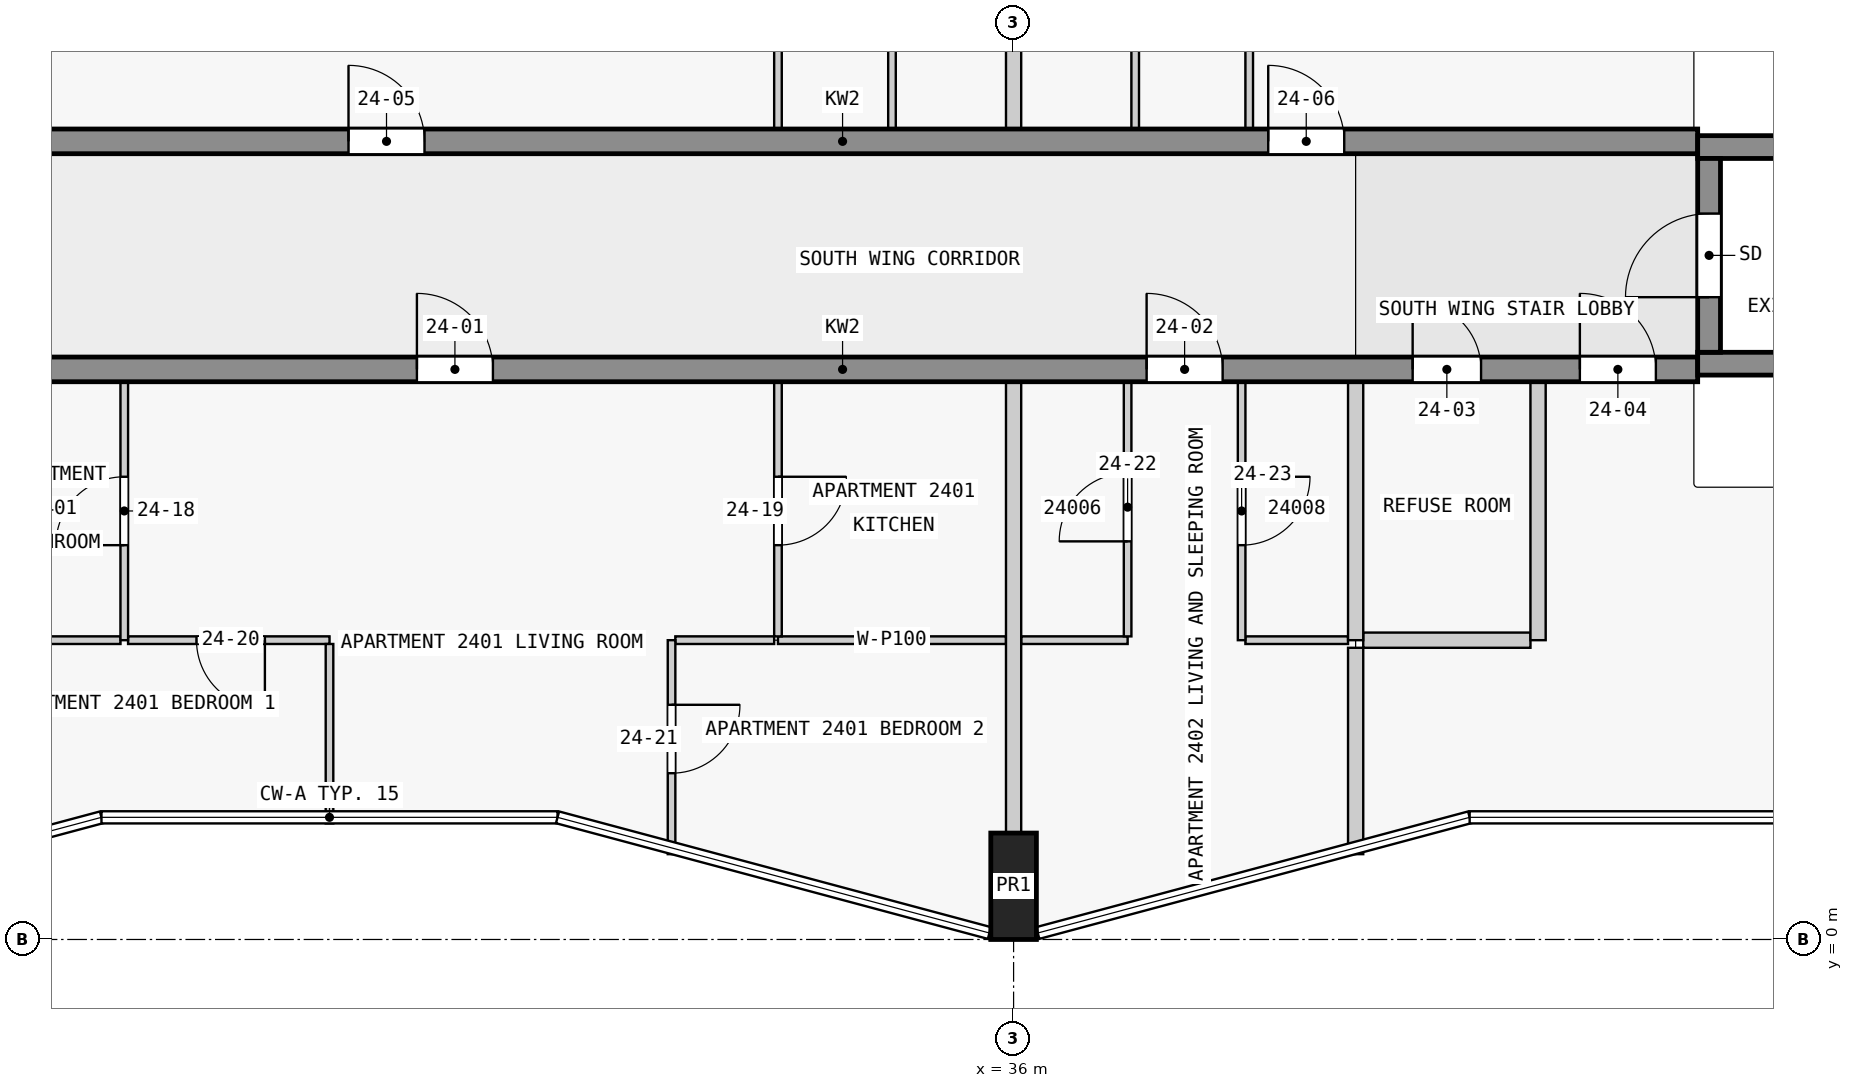
"""IFC4 building model, lengths in metres.
Left out: names, types, materials, properties, quantities, classifications, styles, units other than length and angle.
Written with IfcOpenShell. Run it as: python <this file> out.ifc"""

import sys

from ifc_helpers import new_model, si_unit, direction, frame, frame_2d, origin, origin_2d, place, context, subcontext, project, spatial, rectangle, extrude, element, fill, save


model = new_model("IFC4")
c1 = context("Model", 3, precision=1e-05, world=origin(), true_north=direction((0.0, 1.0)))
c2 = subcontext(c1, "Body", "Model", "MODEL_VIEW")
j1 = project(units=[si_unit("LENGTHUNIT", "METRE"), si_unit("PLANEANGLEUNIT", "RADIAN")], contexts=[c1])
p1 = place(None, origin())
s1 = spatial("IfcSite", under=j1, at=p1, CompositionType="ELEMENT")
p2 = place(p1, origin())
s2 = spatial("IfcBuilding", under=s1, at=p2, CompositionType="ELEMENT")
p3 = place(p2, frame((0.0, 0.0, 95.8)))
s3 = spatial("IfcBuildingStorey", under=s2, at=p3, CompositionType="ELEMENT", Elevation=95.8)
p4 = place(p3, frame((36.0, 0.7, 0.0), z_axis=(0.0, 0.0, 1.0), x_axis=(1.0, 0.0, 0.0)))
e1 = element("IfcColumn", 1, at=p4, inside=s3, PredefinedType="COLUMN", context=c2, shape_type="SweptSolid", body=[
    extrude(rectangle(XDim=0.6, YDim=1.4, at=origin_2d()), origin(), (0.0, 0.0, 1.0), 3.5),
])
p5 = place(p3, frame((45.15, 7.725, 0.0), z_axis=(0.0, 0.0, 1.0), x_axis=(0.0, 1.0, 0.0)))
e2 = element("IfcWall", 2, at=p5, inside=s3, PredefinedType="SHEAR", context=c2, shape_type="SweptSolid", body=[
    extrude(rectangle(XDim=2.55, YDim=0.3, at=frame_2d((1.275, 0.0))), origin(), (0.0, 0.0, 1.0), 3.5),
])
p6 = place(p5, frame((0.725, 0.0, 0.0)))
e3 = element("IfcOpeningElement", 3, at=p6, cuts=e2, PredefinedType="OPENING", context=c2, shape_type="SweptSolid", body=[
    extrude(rectangle(XDim=1.1, YDim=2.1, at=frame_2d((0.55, 1.05))), frame((0.0, 0.16, 0.0), z_axis=(0.0, -1.0, 0.0), x_axis=(1.0, 0.0, 0.0)), (0.0, 0.0, 1.0), 0.32),
])
for number, where, z_axis, x_axis in (
    (4, (45.0, 7.575, 0.0), (0.0, 0.0, 1.0), (1.0, 0.0, 0.0)),
    (5, (45.0, 10.425, 0.0), (0.0, 0.0, 1.0), (1.0, 0.0, 0.0)),
):
    element("IfcWall", number, at=place(p3, frame(where, z_axis=z_axis, x_axis=x_axis)), inside=s3, PredefinedType="SHEAR", context=c2, shape_type="SweptSolid", body=[
        extrude(rectangle(XDim=7.2, YDim=0.3, at=frame_2d((3.6, 0.0))), origin(), (0.0, 0.0, 1.0), 3.5),
    ])
p7 = place(p3, frame((22.5, 7.5, 0.0), z_axis=(0.0, 0.0, 1.0), x_axis=(1.0, 0.0, 0.0)))
e6 = element("IfcWall", 6, at=p7, inside=s3, PredefinedType="SHEAR", context=c2, shape_type="SweptSolid", body=[
    extrude(rectangle(XDim=22.5, YDim=0.325, at=frame_2d((11.25, 0.0))), origin(), (0.0, 0.0, 1.0), 3.25),
])
p8 = place(p7, frame((5.65, 0.0, 0.0)))
e7 = element("IfcOpeningElement", 7, at=p8, cuts=e6, PredefinedType="OPENING", context=c2, shape_type="SweptSolid", body=[
    extrude(rectangle(XDim=1.0, YDim=2.1, at=frame_2d((0.5, 1.05))), frame((0.0, 0.172, 0.0), z_axis=(0.0, -1.0, 0.0), x_axis=(1.0, 0.0, 0.0)), (0.0, 0.0, 1.0), 0.345),
])
p9 = place(p7, frame((15.25, 0.0, 0.0)))
e8 = element("IfcOpeningElement", 8, at=p9, cuts=e6, PredefinedType="OPENING", context=c2, shape_type="SweptSolid", body=[
    extrude(rectangle(XDim=1.0, YDim=2.1, at=frame_2d((0.5, 1.05))), frame((0.0, 0.172, 0.0), z_axis=(0.0, -1.0, 0.0), x_axis=(1.0, 0.0, 0.0)), (0.0, 0.0, 1.0), 0.345),
])
p10 = place(p7, frame((18.75, 0.0, 0.0)))
e9 = element("IfcOpeningElement", 9, at=p10, cuts=e6, PredefinedType="OPENING", context=c2, shape_type="SweptSolid", body=[
    extrude(rectangle(XDim=0.9, YDim=2.1, at=frame_2d((0.45, 1.05))), frame((0.0, 0.172, 0.0), z_axis=(0.0, -1.0, 0.0), x_axis=(1.0, 0.0, 0.0)), (0.0, 0.0, 1.0), 0.345),
])
p11 = place(p7, frame((20.95, 0.0, 0.0)))
e10 = element("IfcOpeningElement", 10, at=p11, cuts=e6, PredefinedType="OPENING", context=c2, shape_type="SweptSolid", body=[
    extrude(rectangle(XDim=1.0, YDim=2.1, at=frame_2d((0.5, 1.05))), frame((0.0, 0.172, 0.0), z_axis=(0.0, -1.0, 0.0), x_axis=(1.0, 0.0, 0.0)), (0.0, 0.0, 1.0), 0.345),
])
p12 = place(p3, frame((22.5, 10.5, 0.0), z_axis=(0.0, 0.0, 1.0), x_axis=(1.0, 0.0, 0.0)))
e11 = element("IfcWall", 11, at=p12, inside=s3, PredefinedType="SHEAR", context=c2, shape_type="SweptSolid", body=[
    extrude(rectangle(XDim=22.5, YDim=0.325, at=frame_2d((11.25, 0.0))), origin(), (0.0, 0.0, 1.0), 3.25),
])
p13 = place(p12, frame((4.75, 0.0, 0.0)))
e12 = element("IfcOpeningElement", 12, at=p13, cuts=e11, PredefinedType="OPENING", context=c2, shape_type="SweptSolid", body=[
    extrude(rectangle(XDim=1.0, YDim=2.1, at=frame_2d((0.5, 1.05))), frame((0.0, 0.172, 0.0), z_axis=(0.0, -1.0, 0.0), x_axis=(1.0, 0.0, 0.0)), (0.0, 0.0, 1.0), 0.345),
])
p14 = place(p12, frame((16.85, 0.0, 0.0)))
e13 = element("IfcOpeningElement", 13, at=p14, cuts=e11, PredefinedType="OPENING", context=c2, shape_type="SweptSolid", body=[
    extrude(rectangle(XDim=1.0, YDim=2.1, at=frame_2d((0.5, 1.05))), frame((0.0, 0.172, 0.0), z_axis=(0.0, -1.0, 0.0), x_axis=(1.0, 0.0, 0.0)), (0.0, 0.0, 1.0), 0.345),
])
p15 = place(p3, frame((27.0, 3.938, 0.0), z_axis=(0.0, 0.0, 1.0), x_axis=(-1.0, 0.0, 0.0)))
e14 = element("IfcWall", 14, at=p15, inside=s3, PredefinedType="PARTITIONING", context=c2, shape_type="SweptSolid", body=[
    extrude(rectangle(XDim=2.65, YDim=0.1, at=frame_2d((1.325, 0.0))), origin(), (0.0, 0.0, 1.0), 3.25),
])
p16 = place(p15, frame((0.85, 0.0, 0.0)))
e15 = element("IfcOpeningElement", 15, at=p16, cuts=e14, PredefinedType="OPENING", context=c2, shape_type="SweptSolid", body=[
    extrude(rectangle(XDim=0.9, YDim=2.1, at=frame_2d((0.45, 1.05))), frame((0.0, 0.06, 0.0), z_axis=(0.0, -1.0, 0.0), x_axis=(1.0, 0.0, 0.0)), (0.0, 0.0, 1.0), 0.12),
])
p17 = place(p3, frame((32.85, 3.938, 0.0), z_axis=(0.0, 0.0, 1.0), x_axis=(-1.0, 0.0, 0.0)))
e16 = element("IfcWall", 16, at=p17, inside=s3, PredefinedType="PARTITIONING", context=c2, shape_type="SweptSolid", body=[
    extrude(rectangle(XDim=1.3, YDim=0.1, at=frame_2d((0.65, 0.0))), origin(), (0.0, 0.0, 1.0), 3.25),
])
p18 = place(p3, frame((22.5, 3.938, 0.0), z_axis=(0.0, 0.0, 1.0), x_axis=(1.0, 0.0, 0.0)))
e17 = element("IfcWall", 17, at=p18, inside=s3, PredefinedType="PARTITIONING", context=c2, shape_type="SweptSolid", body=[
    extrude(rectangle(XDim=1.75, YDim=0.1, at=frame_2d((0.875, 0.0))), origin(), (0.0, 0.0, 1.0), 3.25),
])
p19 = place(p3, frame((32.9, 3.938, 0.0), z_axis=(0.0, 0.0, 1.0), x_axis=(1.0, 0.0, 0.0)))
e18 = element("IfcWall", 18, at=p19, inside=s3, PredefinedType="PARTITIONING", context=c2, shape_type="SweptSolid", body=[
    extrude(rectangle(XDim=3.0, YDim=0.1, at=frame_2d((1.5, 0.0))), origin(), (0.0, 0.0, 1.0), 3.25),
])
p20 = place(p3, frame((36.1, 3.938, 0.0), z_axis=(0.0, 0.0, 1.0), x_axis=(1.0, 0.0, 0.0)))
e19 = element("IfcWall", 19, at=p20, inside=s3, PredefinedType="PARTITIONING", context=c2, shape_type="SweptSolid", body=[
    extrude(rectangle(XDim=1.4, YDim=0.1, at=frame_2d((0.7, 0.0))), origin(), (0.0, 0.0, 1.0), 3.25),
])
p21 = place(p3, frame((39.05, 3.938, 0.0), z_axis=(0.0, 0.0, 1.0), x_axis=(1.0, 0.0, 0.0)))
e20 = element("IfcWall", 20, at=p21, inside=s3, PredefinedType="PARTITIONING", context=c2, shape_type="SweptSolid", body=[
    extrude(rectangle(XDim=1.35, YDim=0.1, at=frame_2d((0.675, 0.0))), origin(), (0.0, 0.0, 1.0), 3.25),
])
p22 = place(p3, frame((40.6, 3.938, 0.0), z_axis=(0.0, 0.0, 1.0), x_axis=(1.0, 0.0, 0.0)))
e21 = element("IfcWall", 21, at=p22, inside=s3, PredefinedType="PARTITIONING", context=c2, shape_type="SweptSolid", body=[
    extrude(rectangle(XDim=2.2, YDim=0.2, at=frame_2d((1.1, 0.0))), origin(), (0.0, 0.0, 1.0), 3.25),
])
p23 = place(p3, frame((24.3, 3.938, 0.0), z_axis=(0.0, 0.0, 1.0), x_axis=(0.0, 1.0, 0.0)))
e22 = element("IfcWall", 22, at=p23, inside=s3, PredefinedType="PARTITIONING", context=c2, shape_type="SweptSolid", body=[
    extrude(rectangle(XDim=3.4, YDim=0.1, at=frame_2d((1.7, 0.0))), origin(), (0.0, 0.0, 1.0), 3.25),
])
p24 = place(p23, frame((1.25, 0.0, 0.0)))
e23 = element("IfcOpeningElement", 23, at=p24, cuts=e22, PredefinedType="OPENING", context=c2, shape_type="SweptSolid", body=[
    extrude(rectangle(XDim=0.9, YDim=2.1, at=frame_2d((0.45, 1.05))), frame((0.0, 0.06, 0.0), z_axis=(0.0, -1.0, 0.0), x_axis=(1.0, 0.0, 0.0)), (0.0, 0.0, 1.0), 0.12),
])
p25 = place(p3, frame((27.0, 1.527, 0.0), z_axis=(0.0, 0.0, 1.0), x_axis=(0.0, 1.0, 0.0)))
e24 = element("IfcWall", 24, at=p25, inside=s3, PredefinedType="PARTITIONING", context=c2, shape_type="SweptSolid", body=[
    extrude(rectangle(XDim=2.361, YDim=0.1, at=frame_2d((1.18, 0.0))), origin(), (0.0, 0.0, 1.0), 3.25),
])
p26 = place(p3, frame((31.5, 3.938, 0.0), z_axis=(0.0, 0.0, 1.0), x_axis=(0.0, -1.0, 0.0)))
e25 = element("IfcWall", 25, at=p26, inside=s3, PredefinedType="PARTITIONING", context=c2, shape_type="SweptSolid", body=[
    extrude(rectangle(XDim=2.815, YDim=0.1, at=frame_2d((1.408, 0.0))), origin(), (0.0, 0.0, 1.0), 3.25),
])
p27 = place(p26, frame((0.85, 0.0, 0.0)))
e26 = element("IfcOpeningElement", 26, at=p27, cuts=e25, PredefinedType="OPENING", context=c2, shape_type="SweptSolid", body=[
    extrude(rectangle(XDim=0.9, YDim=2.1, at=frame_2d((0.45, 1.05))), frame((0.0, 0.06, 0.0), z_axis=(0.0, -1.0, 0.0), x_axis=(1.0, 0.0, 0.0)), (0.0, 0.0, 1.0), 0.12),
])
p28 = place(p3, frame((32.9, 7.337, 0.0), z_axis=(0.0, 0.0, 1.0), x_axis=(0.0, -1.0, 0.0)))
e27 = element("IfcWall", 27, at=p28, inside=s3, PredefinedType="PARTITIONING", context=c2, shape_type="SweptSolid", body=[
    extrude(rectangle(XDim=3.35, YDim=0.1, at=frame_2d((1.675, 0.0))), origin(), (0.0, 0.0, 1.0), 3.25),
])
p29 = place(p28, frame((1.25, 0.0, 0.0)))
e28 = element("IfcOpeningElement", 28, at=p29, cuts=e27, PredefinedType="OPENING", context=c2, shape_type="SweptSolid", body=[
    extrude(rectangle(XDim=0.9, YDim=2.1, at=frame_2d((0.45, 1.05))), frame((0.0, 0.06, 0.0), z_axis=(0.0, -1.0, 0.0), x_axis=(1.0, 0.0, 0.0)), (0.0, 0.0, 1.0), 0.12),
])
p30 = place(p3, frame((32.9, 14.012, 0.0), z_axis=(0.0, 0.0, 1.0), x_axis=(0.0, -1.0, 0.0)))
e29 = element("IfcWall", 29, at=p30, inside=s3, PredefinedType="PARTITIONING", context=c2, shape_type="SweptSolid", body=[
    extrude(rectangle(XDim=3.35, YDim=0.1, at=frame_2d((1.675, 0.0))), origin(), (0.0, 0.0, 1.0), 3.25),
])
p31 = place(p30, frame((1.25, 0.0, 0.0)))
e30 = element("IfcOpeningElement", 30, at=p31, cuts=e29, PredefinedType="OPENING", context=c2, shape_type="SweptSolid", body=[
    extrude(rectangle(XDim=0.9, YDim=2.1, at=frame_2d((0.45, 1.05))), frame((0.0, 0.06, 0.0), z_axis=(0.0, -1.0, 0.0), x_axis=(1.0, 0.0, 0.0)), (0.0, 0.0, 1.0), 0.12),
])
p32 = place(p3, frame((34.4, 10.663, 0.0), z_axis=(0.0, 0.0, 1.0), x_axis=(0.0, 1.0, 0.0)))
e31 = element("IfcWall", 31, at=p32, inside=s3, PredefinedType="PARTITIONING", context=c2, shape_type="SweptSolid", body=[
    extrude(rectangle(XDim=3.35, YDim=0.1, at=frame_2d((1.675, 0.0))), origin(), (0.0, 0.0, 1.0), 3.25),
])
p33 = place(p3, frame((36.0, 1.4, 0.0), z_axis=(0.0, 0.0, 1.0), x_axis=(0.0, 1.0, 0.0)))
e32 = element("IfcWall", 32, at=p33, inside=s3, PredefinedType="PARTITIONING", context=c2, shape_type="SweptSolid", body=[
    extrude(rectangle(XDim=5.938, YDim=0.2, at=frame_2d((2.969, 0.0))), origin(), (0.0, 0.0, 1.0), 3.25),
])
p34 = place(p3, frame((36.0, 10.663, 0.0), z_axis=(0.0, 0.0, 1.0), x_axis=(0.0, 1.0, 0.0)))
e33 = element("IfcWall", 33, at=p34, inside=s3, PredefinedType="PARTITIONING", context=c2, shape_type="SweptSolid", body=[
    extrude(rectangle(XDim=3.4, YDim=0.2, at=frame_2d((1.7, 0.0))), origin(), (0.0, 0.0, 1.0), 3.25),
])
p35 = place(p3, frame((37.5, 3.988, 0.0), z_axis=(0.0, 0.0, 1.0), x_axis=(0.0, 1.0, 0.0)))
e34 = element("IfcWall", 34, at=p35, inside=s3, PredefinedType="PARTITIONING", context=c2, shape_type="SweptSolid", body=[
    extrude(rectangle(XDim=3.35, YDim=0.1, at=frame_2d((1.675, 0.0))), origin(), (0.0, 0.0, 1.0), 3.25),
])
p36 = place(p35, frame((1.25, 0.0, 0.0)))
e35 = element("IfcOpeningElement", 35, at=p36, cuts=e34, PredefinedType="OPENING", context=c2, shape_type="SweptSolid", body=[
    extrude(rectangle(XDim=0.9, YDim=2.1, at=frame_2d((0.45, 1.05))), frame((0.0, 0.06, 0.0), z_axis=(0.0, -1.0, 0.0), x_axis=(1.0, 0.0, 0.0)), (0.0, 0.0, 1.0), 0.12),
])
p37 = place(p3, frame((37.6, 10.663, 0.0), z_axis=(0.0, 0.0, 1.0), x_axis=(0.0, 1.0, 0.0)))
e36 = element("IfcWall", 36, at=p37, inside=s3, PredefinedType="PARTITIONING", context=c2, shape_type="SweptSolid", body=[
    extrude(rectangle(XDim=3.35, YDim=0.1, at=frame_2d((1.675, 0.0))), origin(), (0.0, 0.0, 1.0), 3.25),
])
p38 = place(p3, frame((39.0, 7.337, 0.0), z_axis=(0.0, 0.0, 1.0), x_axis=(0.0, -1.0, 0.0)))
e37 = element("IfcWall", 37, at=p38, inside=s3, PredefinedType="PARTITIONING", context=c2, shape_type="SweptSolid", body=[
    extrude(rectangle(XDim=3.4, YDim=0.1, at=frame_2d((1.7, 0.0))), origin(), (0.0, 0.0, 1.0), 3.25),
])
p39 = place(p38, frame((1.25, 0.0, 0.0)))
e38 = element("IfcOpeningElement", 38, at=p39, cuts=e37, PredefinedType="OPENING", context=c2, shape_type="SweptSolid", body=[
    extrude(rectangle(XDim=0.9, YDim=2.1, at=frame_2d((0.45, 1.05))), frame((0.0, 0.06, 0.0), z_axis=(0.0, -1.0, 0.0), x_axis=(1.0, 0.0, 0.0)), (0.0, 0.0, 1.0), 0.12),
])
p40 = place(p3, frame((39.1, 10.663, 0.0), z_axis=(0.0, 0.0, 1.0), x_axis=(0.0, 1.0, 0.0)))
e39 = element("IfcWall", 39, at=p40, inside=s3, PredefinedType="PARTITIONING", context=c2, shape_type="SweptSolid", body=[
    extrude(rectangle(XDim=3.35, YDim=0.1, at=frame_2d((1.675, 0.0))), origin(), (0.0, 0.0, 1.0), 3.25),
])
p41 = place(p40, frame((1.25, 0.0, 0.0)))
e40 = element("IfcOpeningElement", 40, at=p41, cuts=e39, PredefinedType="OPENING", context=c2, shape_type="SweptSolid", body=[
    extrude(rectangle(XDim=0.9, YDim=2.1, at=frame_2d((0.45, 1.05))), frame((0.0, 0.06, 0.0), z_axis=(0.0, -1.0, 0.0), x_axis=(1.0, 0.0, 0.0)), (0.0, 0.0, 1.0), 0.12),
])
p42 = place(p3, frame((40.5, 3.837, 0.0), z_axis=(0.0, 0.0, 1.0), x_axis=(0.0, -1.0, 0.0)))
e41 = element("IfcWall", 41, at=p42, inside=s3, PredefinedType="PARTITIONING", context=c2, shape_type="SweptSolid", body=[
    extrude(rectangle(XDim=2.715, YDim=0.2, at=frame_2d((1.357, 0.0))), origin(), (0.0, 0.0, 1.0), 3.25),
])
for number, where, z_axis, x_axis in (
    (42, (40.5, 3.938, 0.0), (0.0, 0.0, 1.0), (0.0, 1.0, 0.0)),
    (43, (42.9, 3.938, 0.0), (0.0, 0.0, 1.0), (0.0, 1.0, 0.0)),
):
    element("IfcWall", number, at=place(p3, frame(where, z_axis=z_axis, x_axis=x_axis)), inside=s3, PredefinedType="PARTITIONING", context=c2, shape_type="SweptSolid", body=[
        extrude(rectangle(XDim=3.4, YDim=0.2, at=frame_2d((1.7, 0.0))), origin(), (0.0, 0.0, 1.0), 3.25),
    ])
p43 = place(p6, origin())
e44 = element("IfcDoor", 44, at=p43, inside=s3, OperationType="SINGLE_SWING_LEFT", PredefinedType="DOOR", context=c2, shape_type="SweptSolid", body=[
    extrude(rectangle(XDim=1.1, YDim=2.1, at=frame_2d((0.55, 1.05))), frame((0.0, 0.025, 0.0), z_axis=(0.0, -1.0, 0.0), x_axis=(1.0, 0.0, 0.0)), (0.0, 0.0, 1.0), 0.05),
])
fill(e3, e44)
p44 = place(p8, origin())
e45 = element("IfcDoor", 45, at=p44, inside=s3, OperationType="SINGLE_SWING_LEFT", PredefinedType="DOOR", context=c2, shape_type="SweptSolid", body=[
    extrude(rectangle(XDim=1.0, YDim=2.1, at=frame_2d((0.5, 1.05))), frame((0.0, 0.025, 0.0), z_axis=(0.0, -1.0, 0.0), x_axis=(1.0, 0.0, 0.0)), (0.0, 0.0, 1.0), 0.05),
])
fill(e7, e45)
p45 = place(p9, origin())
e46 = element("IfcDoor", 46, at=p45, inside=s3, OperationType="SINGLE_SWING_RIGHT", PredefinedType="DOOR", context=c2, shape_type="SweptSolid", body=[
    extrude(rectangle(XDim=1.0, YDim=2.1, at=frame_2d((0.5, 1.05))), frame((0.0, 0.025, 0.0), z_axis=(0.0, -1.0, 0.0), x_axis=(1.0, 0.0, 0.0)), (0.0, 0.0, 1.0), 0.05),
])
fill(e8, e46)
p46 = place(p10, origin())
e47 = element("IfcDoor", 47, at=p46, inside=s3, OperationType="SINGLE_SWING_RIGHT", PredefinedType="DOOR", context=c2, shape_type="SweptSolid", body=[
    extrude(rectangle(XDim=0.9, YDim=2.1, at=frame_2d((0.45, 1.05))), frame((0.0, 0.025, 0.0), z_axis=(0.0, -1.0, 0.0), x_axis=(1.0, 0.0, 0.0)), (0.0, 0.0, 1.0), 0.05),
])
fill(e9, e47)
p47 = place(p11, origin())
e48 = element("IfcDoor", 48, at=p47, inside=s3, OperationType="SINGLE_SWING_RIGHT", PredefinedType="DOOR", context=c2, shape_type="SweptSolid", body=[
    extrude(rectangle(XDim=1.0, YDim=2.1, at=frame_2d((0.5, 1.05))), frame((0.0, 0.025, 0.0), z_axis=(0.0, -1.0, 0.0), x_axis=(1.0, 0.0, 0.0)), (0.0, 0.0, 1.0), 0.05),
])
fill(e10, e48)
p48 = place(p13, origin())
e49 = element("IfcDoor", 49, at=p48, inside=s3, OperationType="SINGLE_SWING_LEFT", PredefinedType="DOOR", context=c2, shape_type="SweptSolid", body=[
    extrude(rectangle(XDim=1.0, YDim=2.1, at=frame_2d((0.5, 1.05))), frame((0.0, 0.025, 0.0), z_axis=(0.0, -1.0, 0.0), x_axis=(1.0, 0.0, 0.0)), (0.0, 0.0, 1.0), 0.05),
])
fill(e12, e49)
p49 = place(p14, origin())
e50 = element("IfcDoor", 50, at=p49, inside=s3, OperationType="SINGLE_SWING_RIGHT", PredefinedType="DOOR", context=c2, shape_type="SweptSolid", body=[
    extrude(rectangle(XDim=1.0, YDim=2.1, at=frame_2d((0.5, 1.05))), frame((0.0, 0.025, 0.0), z_axis=(0.0, -1.0, 0.0), x_axis=(1.0, 0.0, 0.0)), (0.0, 0.0, 1.0), 0.05),
])
fill(e13, e50)
p50 = place(p24, origin())
e51 = element("IfcDoor", 51, at=p50, inside=s3, OperationType="SINGLE_SWING_LEFT", PredefinedType="DOOR", context=c2, shape_type="SweptSolid", body=[
    extrude(rectangle(XDim=0.9, YDim=2.1, at=frame_2d((0.45, 1.05))), frame((0.0, 0.025, 0.0), z_axis=(0.0, -1.0, 0.0), x_axis=(1.0, 0.0, 0.0)), (0.0, 0.0, 1.0), 0.05),
])
fill(e23, e51)
p51 = place(p29, origin())
e52 = element("IfcDoor", 52, at=p51, inside=s3, OperationType="SINGLE_SWING_RIGHT", PredefinedType="DOOR", context=c2, shape_type="SweptSolid", body=[
    extrude(rectangle(XDim=0.9, YDim=2.1, at=frame_2d((0.45, 1.05))), frame((0.0, 0.025, 0.0), z_axis=(0.0, -1.0, 0.0), x_axis=(1.0, 0.0, 0.0)), (0.0, 0.0, 1.0), 0.05),
])
fill(e28, e52)
p52 = place(p16, origin())
e53 = element("IfcDoor", 53, at=p52, inside=s3, OperationType="SINGLE_SWING_LEFT", PredefinedType="DOOR", context=c2, shape_type="SweptSolid", body=[
    extrude(rectangle(XDim=0.9, YDim=2.1, at=frame_2d((0.45, 1.05))), frame((0.0, 0.025, 0.0), z_axis=(0.0, -1.0, 0.0), x_axis=(1.0, 0.0, 0.0)), (0.0, 0.0, 1.0), 0.05),
])
fill(e15, e53)
p53 = place(p27, origin())
e54 = element("IfcDoor", 54, at=p53, inside=s3, OperationType="SINGLE_SWING_LEFT", PredefinedType="DOOR", context=c2, shape_type="SweptSolid", body=[
    extrude(rectangle(XDim=0.9, YDim=2.1, at=frame_2d((0.45, 1.05))), frame((0.0, 0.025, 0.0), z_axis=(0.0, -1.0, 0.0), x_axis=(1.0, 0.0, 0.0)), (0.0, 0.0, 1.0), 0.05),
])
fill(e26, e54)
p54 = place(p36, origin())
e55 = element("IfcDoor", 55, at=p54, inside=s3, OperationType="SINGLE_SWING_RIGHT", PredefinedType="DOOR", context=c2, shape_type="SweptSolid", body=[
    extrude(rectangle(XDim=0.9, YDim=2.1, at=frame_2d((0.45, 1.05))), frame((0.0, 0.025, 0.0), z_axis=(0.0, -1.0, 0.0), x_axis=(1.0, 0.0, 0.0)), (0.0, 0.0, 1.0), 0.05),
])
fill(e35, e55)
p55 = place(p39, origin())
e56 = element("IfcDoor", 56, at=p55, inside=s3, OperationType="SINGLE_SWING_LEFT", PredefinedType="DOOR", context=c2, shape_type="SweptSolid", body=[
    extrude(rectangle(XDim=0.9, YDim=2.1, at=frame_2d((0.45, 1.05))), frame((0.0, 0.025, 0.0), z_axis=(0.0, -1.0, 0.0), x_axis=(1.0, 0.0, 0.0)), (0.0, 0.0, 1.0), 0.05),
])
fill(e38, e56)
save(model, sys.argv[1])
